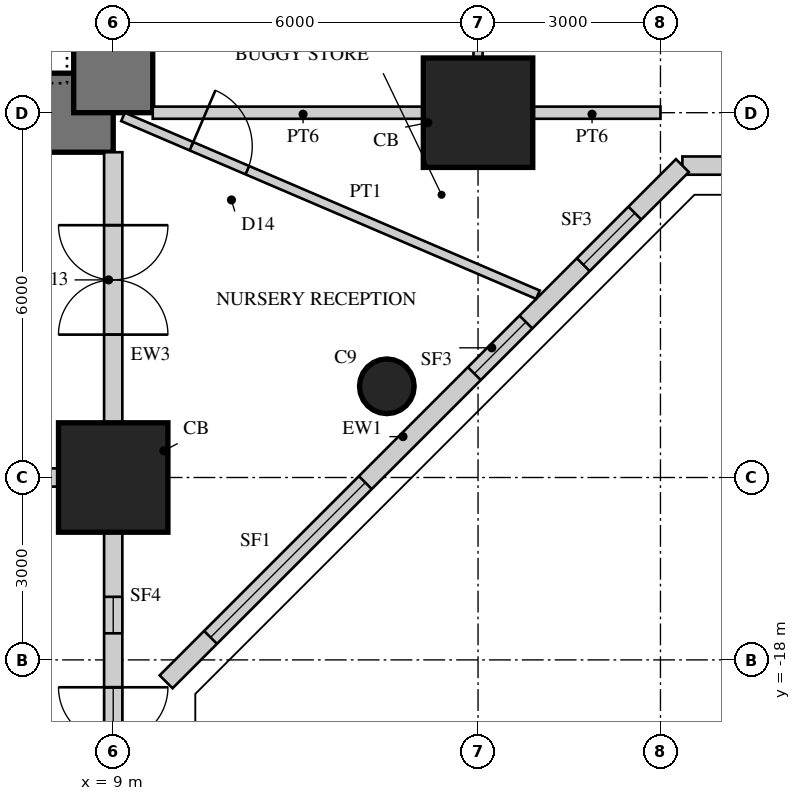
"""IFC4 building model, lengths in metres.
Left out: names, types, materials, properties, quantities, classifications, styles, units other than length and angle.
Written with IfcOpenShell. Run it as: python <this file> out.ifc"""

import sys

from ifc_helpers import new_model, si_unit, direction, frame, frame_2d, origin, origin_2d, place, context, subcontext, project, spatial, rectangle, hollow_rectangle, circle, extrude, element, fill, save


model = new_model("IFC4")
c1 = context("Model", 3, precision=1e-05, world=origin(), true_north=direction((0.0, 1.0)))
c2 = subcontext(c1, "Body", "Model", "MODEL_VIEW")
j1 = project(units=[si_unit("LENGTHUNIT", "METRE"), si_unit("PLANEANGLEUNIT", "RADIAN")], contexts=[c1])
p1 = place(None, origin())
s1 = spatial("IfcSite", under=j1, at=p1, CompositionType="ELEMENT")
p2 = place(p1, origin())
s2 = spatial("IfcBuilding", under=s1, at=p2, CompositionType="ELEMENT")
p3 = place(p2, origin())
s3 = spatial("IfcBuildingStorey", under=s2, at=p3, CompositionType="ELEMENT", Elevation=0.0)
p4 = place(p3, frame((-9.0, -9.0, 0.0), z_axis=(0.0, 0.0, 1.0), x_axis=(1.0, 0.0, 0.0)))
e1 = element("IfcWall", 1, at=p4, inside=s3, PredefinedType="SHEAR", context=c2, shape_type="SweptSolid", body=[
    extrude(rectangle(XDim=18.0, YDim=1.3, at=frame_2d((9.0, 0.0))), origin(), (0.0, 0.0, 1.0), 5.0),
])
p5 = place(p4, frame((9.8, 0.0, 0.0)))
e2 = element("IfcOpeningElement", 2, at=p5, cuts=e1, PredefinedType="OPENING", context=c2, shape_type="SweptSolid", body=[
    extrude(rectangle(XDim=1.0, YDim=2.4, at=frame_2d((0.5, 1.2))), frame((0.0, 0.66, 0.0), z_axis=(0.0, -1.0, 0.0), x_axis=(1.0, 0.0, 0.0)), (0.0, 0.0, 1.0), 1.32),
])
p6 = place(p3, frame((9.0, -9.0, 0.0), z_axis=(0.0, 0.0, 1.0), x_axis=(0.0, 1.0, 0.0)))
e3 = element("IfcWall", 3, at=p6, inside=s3, PredefinedType="SHEAR", context=c2, shape_type="SweptSolid", body=[
    extrude(rectangle(XDim=18.0, YDim=1.3, at=frame_2d((9.0, 0.0))), origin(), (0.0, 0.0, 1.0), 5.0),
])
p7 = place(p6, frame((9.8, 0.0, 0.0)))
e4 = element("IfcOpeningElement", 4, at=p7, cuts=e3, PredefinedType="OPENING", context=c2, shape_type="SweptSolid", body=[
    extrude(rectangle(XDim=1.0, YDim=2.4, at=frame_2d((0.5, 1.2))), frame((0.0, 0.66, 0.0), z_axis=(0.0, -1.0, 0.0), x_axis=(1.0, 0.0, 0.0)), (0.0, 0.0, 1.0), 1.32),
])
for number, where, z_axis, x_axis in (
    (5, (15.0, -9.0, 0.0), (0.0, 0.0, 1.0), (1.0, 0.0, 0.0)),
    (6, (9.0, -15.0, 0.0), (0.0, 0.0, 1.0), (1.0, 0.0, 0.0)),
):
    element("IfcColumn", number, at=place(p3, frame(where, z_axis=z_axis, x_axis=x_axis)), inside=s3, PredefinedType="COLUMN", context=c2, shape_type="SweptSolid", body=[
        extrude(rectangle(XDim=1.8, YDim=1.8, at=origin_2d()), origin(), (0.0, 0.0, 1.0), 5.0),
    ])
p8 = place(p3, frame((13.5, -13.5, 0.0), z_axis=(0.0, 0.0, 1.0), x_axis=(1.0, 0.0, 0.0)))
e7 = element("IfcColumn", 7, at=p8, inside=s3, PredefinedType="COLUMN", context=c2, shape_type="SweptSolid", body=[
    extrude(circle(Radius=0.45, at=origin_2d()), origin(), (0.0, 0.0, 1.0), 5.0),
])
p9 = place(p3, frame((18.36, -9.87, 0.0), z_axis=(0.0, 0.0, 1.0), x_axis=(1.0, 0.0, 0.0)))
e8 = element("IfcWall", 8, at=p9, inside=s3, PredefinedType="SOLIDWALL", context=c2, shape_type="SweptSolid", body=[
    extrude(rectangle(XDim=6.0, YDim=0.3, at=frame_2d((3.0, 0.0))), origin(), (0.0, 0.0, 1.0), 4.8),
])
p10 = place(p9, frame((0.87, 0.0, 0.3)))
e9 = element("IfcOpeningElement", 9, at=p10, cuts=e8, PredefinedType="OPENING", context=c2, shape_type="SweptSolid", body=[
    extrude(rectangle(XDim=1.2, YDim=3.9, at=frame_2d((0.6, 1.95))), frame((0.0, 0.16, 0.0), z_axis=(0.0, -1.0, 0.0), x_axis=(1.0, 0.0, 0.0)), (0.0, 0.0, 1.0), 0.32),
])
p11 = place(p9, frame((3.165, 0.0, 0.3)))
e10 = element("IfcOpeningElement", 10, at=p11, cuts=e8, PredefinedType="OPENING", context=c2, shape_type="SweptSolid", body=[
    extrude(rectangle(XDim=1.2, YDim=3.9, at=frame_2d((0.6, 1.95))), frame((0.0, 0.16, 0.0), z_axis=(0.0, -1.0, 0.0), x_axis=(1.0, 0.0, 0.0)), (0.0, 0.0, 1.0), 0.32),
])
p12 = place(p3, frame((9.87, -18.36, 0.0), z_axis=(0.0, 0.0, 1.0), x_axis=(0.707106781187, 0.707106781187, 0.0)))
e11 = element("IfcWall", 11, at=p12, inside=s3, PredefinedType="SOLIDWALL", context=c2, shape_type="SweptSolid", body=[
    extrude(rectangle(XDim=12.007, YDim=0.3, at=frame_2d((6.003, 0.0))), origin(), (0.0, 0.0, 1.0), 4.8),
])
p13 = place(p12, frame((1.034, 0.0, 0.3)))
e12 = element("IfcOpeningElement", 12, at=p13, cuts=e11, PredefinedType="OPENING", context=c2, shape_type="SweptSolid", body=[
    extrude(rectangle(XDim=3.6, YDim=3.9, at=frame_2d((1.8, 1.95))), frame((0.0, 0.16, 0.0), z_axis=(0.0, -1.0, 0.0), x_axis=(1.0, 0.0, 0.0)), (0.0, 0.0, 1.0), 0.32),
])
p14 = place(p12, frame((7.169, 0.0, 0.3)))
e13 = element("IfcOpeningElement", 13, at=p14, cuts=e11, PredefinedType="OPENING", context=c2, shape_type="SweptSolid", body=[
    extrude(rectangle(XDim=1.2, YDim=3.9, at=frame_2d((0.6, 1.95))), frame((0.0, 0.16, 0.0), z_axis=(0.0, -1.0, 0.0), x_axis=(1.0, 0.0, 0.0)), (0.0, 0.0, 1.0), 0.32),
])
p15 = place(p12, frame((9.702, 0.0, 0.3)))
e14 = element("IfcOpeningElement", 14, at=p15, cuts=e11, PredefinedType="OPENING", context=c2, shape_type="SweptSolid", body=[
    extrude(rectangle(XDim=1.2, YDim=3.9, at=frame_2d((0.6, 1.95))), frame((0.0, 0.16, 0.0), z_axis=(0.0, -1.0, 0.0), x_axis=(1.0, 0.0, 0.0)), (0.0, 0.0, 1.0), 0.32),
])
p16 = place(p3, frame((15.0, -8.25, 0.0), z_axis=(0.0, 0.0, 1.0), x_axis=(0.0, 1.0, 0.0)))
e15 = element("IfcWall", 15, at=p16, inside=s3, PredefinedType="PARTITIONING", context=c2, shape_type="SweptSolid", body=[
    extrude(rectangle(XDim=7.45, YDim=0.15, at=frame_2d((3.725, 0.0))), origin(), (0.0, 0.0, 1.0), 3.85),
])
p17 = place(p3, frame((2.375, -15.0, 0.0), z_axis=(0.0, 0.0, 1.0), x_axis=(1.0, 0.0, 0.0)))
e16 = element("IfcWall", 16, at=p17, inside=s3, PredefinedType="SOLIDWALL", context=c2, shape_type="SweptSolid", body=[
    extrude(rectangle(XDim=5.875, YDim=0.3, at=frame_2d((2.938, 0.0))), origin(), (0.0, 0.0, 1.0), 3.85),
])
p18 = place(p17, frame((2.438, 0.0, 0.0)))
e17 = element("IfcOpeningElement", 17, at=p18, cuts=e16, PredefinedType="OPENING", context=c2, shape_type="SweptSolid", body=[
    extrude(rectangle(XDim=1.8, YDim=2.4, at=frame_2d((0.9, 1.2))), frame((0.0, 0.16, 0.0), z_axis=(0.0, -1.0, 0.0), x_axis=(1.0, 0.0, 0.0)), (0.0, 0.0, 1.0), 0.32),
])
p19 = place(p17, frame((0.619, 0.0, 0.3)))
e18 = element("IfcOpeningElement", 18, at=p19, cuts=e16, PredefinedType="OPENING", context=c2, shape_type="SweptSolid", body=[
    extrude(rectangle(XDim=1.2, YDim=3.4, at=frame_2d((0.6, 1.7))), frame((0.0, 0.16, 0.0), z_axis=(0.0, -1.0, 0.0), x_axis=(1.0, 0.0, 0.0)), (0.0, 0.0, 1.0), 0.32),
])
p20 = place(p3, frame((9.161, -9.069, 0.0), z_axis=(0.0, 0.0, 1.0), x_axis=(0.919138226556, -0.393935172945, 0.0)))
e19 = element("IfcWall", 19, at=p20, inside=s3, PredefinedType="PARTITIONING", context=c2, shape_type="SweptSolid", body=[
    extrude(rectangle(XDim=7.425, YDim=0.15, at=frame_2d((3.712, 0.0))), origin(), (0.0, 0.0, 1.0), 4.8),
])
p21 = place(p20, frame((1.225, 0.0, 0.0)))
e20 = element("IfcOpeningElement", 20, at=p21, cuts=e19, PredefinedType="OPENING", context=c2, shape_type="SweptSolid", body=[
    extrude(rectangle(XDim=1.0, YDim=2.2, at=frame_2d((0.5, 1.1))), frame((0.0, 0.085, 0.0), z_axis=(0.0, -1.0, 0.0), x_axis=(1.0, 0.0, 0.0)), (0.0, 0.0, 1.0), 0.17),
])
p22 = place(p3, frame((9.0, -9.65, 0.0), z_axis=(0.0, 0.0, 1.0), x_axis=(0.0, -1.0, 0.0)))
e21 = element("IfcWall", 21, at=p22, inside=s3, PredefinedType="SOLIDWALL", context=c2, shape_type="SweptSolid", body=[
    extrude(rectangle(XDim=4.6, YDim=0.3, at=frame_2d((2.3, 0.0))), origin(), (0.0, 0.0, 1.0), 3.8),
])
p23 = place(p22, frame((1.2, 0.0, 0.0)))
e22 = element("IfcOpeningElement", 22, at=p23, cuts=e21, PredefinedType="OPENING", context=c2, shape_type="SweptSolid", body=[
    extrude(rectangle(XDim=1.8, YDim=2.4, at=frame_2d((0.9, 1.2))), frame((0.0, 0.16, 0.0), z_axis=(0.0, -1.0, 0.0), x_axis=(1.0, 0.0, 0.0)), (0.0, 0.0, 1.0), 0.32),
])
p24 = place(p3, frame((9.0, -15.75, 0.0), z_axis=(0.0, 0.0, 1.0), x_axis=(0.0, -1.0, 0.0)))
e23 = element("IfcWall", 23, at=p24, inside=s3, PredefinedType="SOLIDWALL", context=c2, shape_type="SweptSolid", body=[
    extrude(rectangle(XDim=7.5, YDim=0.3, at=frame_2d((3.75, 0.0))), origin(), (0.0, 0.0, 1.0), 3.8),
])
p25 = place(p24, frame((2.7, 0.0, 0.0)))
e24 = element("IfcOpeningElement", 24, at=p25, cuts=e23, PredefinedType="OPENING", context=c2, shape_type="SweptSolid", body=[
    extrude(rectangle(XDim=1.8, YDim=2.4, at=frame_2d((0.9, 1.2))), frame((0.0, 0.16, 0.0), z_axis=(0.0, -1.0, 0.0), x_axis=(1.0, 0.0, 0.0)), (0.0, 0.0, 1.0), 0.32),
])
p26 = place(p24, frame((1.212, 0.0, 0.3)))
e25 = element("IfcOpeningElement", 25, at=p26, cuts=e23, PredefinedType="OPENING", context=c2, shape_type="SweptSolid", body=[
    extrude(rectangle(XDim=0.6, YDim=3.4, at=frame_2d((0.3, 1.7))), frame((0.0, 0.16, 0.0), z_axis=(0.0, -1.0, 0.0), x_axis=(1.0, 0.0, 0.0)), (0.0, 0.0, 1.0), 0.32),
])
p27 = place(p24, frame((4.66, 0.0, 0.3)))
e26 = element("IfcOpeningElement", 26, at=p27, cuts=e23, PredefinedType="OPENING", context=c2, shape_type="SweptSolid", body=[
    extrude(rectangle(XDim=0.6, YDim=3.4, at=frame_2d((0.3, 1.7))), frame((0.0, 0.16, 0.0), z_axis=(0.0, -1.0, 0.0), x_axis=(1.0, 0.0, 0.0)), (0.0, 0.0, 1.0), 0.32),
])
p28 = place(p24, frame((2.7, 0.0, 2.6)))
e27 = element("IfcOpeningElement", 27, at=p28, cuts=e23, PredefinedType="OPENING", context=c2, shape_type="SweptSolid", body=[
    extrude(rectangle(XDim=1.8, YDim=1.1, at=frame_2d((0.9, 0.55))), frame((0.0, 0.16, 0.0), z_axis=(0.0, -1.0, 0.0), x_axis=(1.0, 0.0, 0.0)), (0.0, 0.0, 1.0), 0.32),
])
p29 = place(p3, frame((14.25, -9.0, 0.0), z_axis=(0.0, 0.0, 1.0), x_axis=(-1.0, 0.0, 0.0)))
e28 = element("IfcWall", 28, at=p29, inside=s3, PredefinedType="SOLIDWALL", context=c2, shape_type="SweptSolid", body=[
    extrude(rectangle(XDim=4.6, YDim=0.2, at=frame_2d((2.3, 0.0))), origin(), (0.0, 0.0, 1.0), 3.8),
])
p30 = place(p3, frame((18.0, -9.0, 0.0), z_axis=(0.0, 0.0, 1.0), x_axis=(-1.0, 0.0, 0.0)))
e29 = element("IfcWall", 29, at=p30, inside=s3, PredefinedType="SOLIDWALL", context=c2, shape_type="SweptSolid", body=[
    extrude(rectangle(XDim=2.25, YDim=0.2, at=frame_2d((1.125, 0.0))), origin(), (0.0, 0.0, 1.0), 3.8),
])
p31 = place(p13, origin())
e30 = element("IfcWindow", 30, at=p31, inside=s3, PartitioningType="SINGLE_PANEL", PredefinedType="WINDOW", context=c2, shape_type="SweptSolid", body=[
    extrude(hollow_rectangle(XDim=3.6, YDim=3.9, WallThickness=0.06, at=frame_2d((1.8, 1.95))), frame((0.0, 0.03, 0.0), z_axis=(0.0, -1.0, 0.0), x_axis=(1.0, 0.0, 0.0)), (0.0, 0.0, 1.0), 0.06),
    extrude(rectangle(XDim=3.479, YDim=3.779, at=frame_2d((1.8, 1.95))), frame((0.0, 0.03, 0.0), z_axis=(0.0, -1.0, 0.0), x_axis=(1.0, 0.0, 0.0)), (0.0, 0.0, 1.0), 0.06),
])
fill(e12, e30)
p32 = place(p14, origin())
e31 = element("IfcWindow", 31, at=p32, inside=s3, PartitioningType="SINGLE_PANEL", PredefinedType="WINDOW", context=c2, shape_type="SweptSolid", body=[
    extrude(hollow_rectangle(XDim=1.2, YDim=3.9, WallThickness=0.06, at=frame_2d((0.6, 1.95))), frame((0.0, 0.03, 0.0), z_axis=(0.0, -1.0, 0.0), x_axis=(1.0, 0.0, 0.0)), (0.0, 0.0, 1.0), 0.06),
    extrude(rectangle(XDim=1.079, YDim=3.779, at=frame_2d((0.6, 1.95))), frame((0.0, 0.03, 0.0), z_axis=(0.0, -1.0, 0.0), x_axis=(1.0, 0.0, 0.0)), (0.0, 0.0, 1.0), 0.06),
])
fill(e13, e31)
p33 = place(p15, origin())
e32 = element("IfcWindow", 32, at=p33, inside=s3, PartitioningType="SINGLE_PANEL", PredefinedType="WINDOW", context=c2, shape_type="SweptSolid", body=[
    extrude(hollow_rectangle(XDim=1.2, YDim=3.9, WallThickness=0.06, at=frame_2d((0.6, 1.95))), frame((0.0, 0.03, 0.0), z_axis=(0.0, -1.0, 0.0), x_axis=(1.0, 0.0, 0.0)), (0.0, 0.0, 1.0), 0.06),
    extrude(rectangle(XDim=1.079, YDim=3.779, at=frame_2d((0.6, 1.95))), frame((0.0, 0.03, 0.0), z_axis=(0.0, -1.0, 0.0), x_axis=(1.0, 0.0, 0.0)), (0.0, 0.0, 1.0), 0.06),
])
fill(e14, e32)
p34 = place(p21, origin())
e33 = element("IfcDoor", 33, at=p34, inside=s3, OperationType="SINGLE_SWING_LEFT", PredefinedType="DOOR", context=c2, shape_type="SweptSolid", body=[
    extrude(rectangle(XDim=1.0, YDim=2.2, at=frame_2d((0.5, 1.1))), frame((0.0, 0.025, 0.0), z_axis=(0.0, -1.0, 0.0), x_axis=(1.0, 0.0, 0.0)), (0.0, 0.0, 1.0), 0.05),
])
fill(e20, e33)
p35 = place(p23, origin())
e34 = element("IfcDoor", 34, at=p35, inside=s3, OperationType="DOUBLE_DOOR_DOUBLE_SWING", PredefinedType="DOOR", context=c2, shape_type="SweptSolid", body=[
    extrude(hollow_rectangle(XDim=1.8, YDim=2.4, WallThickness=0.06, at=frame_2d((0.9, 1.2))), frame((0.0, 0.025, 0.0), z_axis=(0.0, -1.0, 0.0), x_axis=(1.0, 0.0, 0.0)), (0.0, 0.0, 1.0), 0.05),
    extrude(rectangle(XDim=1.679, YDim=2.279, at=frame_2d((0.9, 1.2))), frame((0.0, 0.025, 0.0), z_axis=(0.0, -1.0, 0.0), x_axis=(1.0, 0.0, 0.0)), (0.0, 0.0, 1.0), 0.05),
])
fill(e22, e34)
p36 = place(p25, origin())
e35 = element("IfcDoor", 35, at=p36, inside=s3, OperationType="DOUBLE_DOOR_DOUBLE_SWING", PredefinedType="DOOR", context=c2, shape_type="SweptSolid", body=[
    extrude(hollow_rectangle(XDim=1.8, YDim=2.4, WallThickness=0.06, at=frame_2d((0.9, 1.2))), frame((0.0, 0.025, 0.0), z_axis=(0.0, -1.0, 0.0), x_axis=(1.0, 0.0, 0.0)), (0.0, 0.0, 1.0), 0.05),
    extrude(rectangle(XDim=1.679, YDim=2.279, at=frame_2d((0.9, 1.2))), frame((0.0, 0.025, 0.0), z_axis=(0.0, -1.0, 0.0), x_axis=(1.0, 0.0, 0.0)), (0.0, 0.0, 1.0), 0.05),
])
fill(e24, e35)
p37 = place(p26, origin())
e36 = element("IfcWindow", 36, at=p37, inside=s3, PartitioningType="SINGLE_PANEL", PredefinedType="WINDOW", context=c2, shape_type="SweptSolid", body=[
    extrude(hollow_rectangle(XDim=0.6, YDim=3.4, WallThickness=0.06, at=frame_2d((0.3, 1.7))), frame((0.0, 0.03, 0.0), z_axis=(0.0, -1.0, 0.0), x_axis=(1.0, 0.0, 0.0)), (0.0, 0.0, 1.0), 0.06),
    extrude(rectangle(XDim=0.479, YDim=3.279, at=frame_2d((0.3, 1.7))), frame((0.0, 0.03, 0.0), z_axis=(0.0, -1.0, 0.0), x_axis=(1.0, 0.0, 0.0)), (0.0, 0.0, 1.0), 0.06),
])
fill(e25, e36)
p38 = place(p28, origin())
e37 = element("IfcWindow", 37, at=p38, inside=s3, PartitioningType="SINGLE_PANEL", PredefinedType="WINDOW", context=c2, shape_type="SweptSolid", body=[
    extrude(hollow_rectangle(XDim=1.8, YDim=1.1, WallThickness=0.06, at=frame_2d((0.9, 0.55))), frame((0.0, 0.03, 0.0), z_axis=(0.0, -1.0, 0.0), x_axis=(1.0, 0.0, 0.0)), (0.0, 0.0, 1.0), 0.06),
    extrude(rectangle(XDim=1.679, YDim=0.979, at=frame_2d((0.9, 0.55))), frame((0.0, 0.03, 0.0), z_axis=(0.0, -1.0, 0.0), x_axis=(1.0, 0.0, 0.0)), (0.0, 0.0, 1.0), 0.06),
])
fill(e27, e37)
save(model, sys.argv[1])
